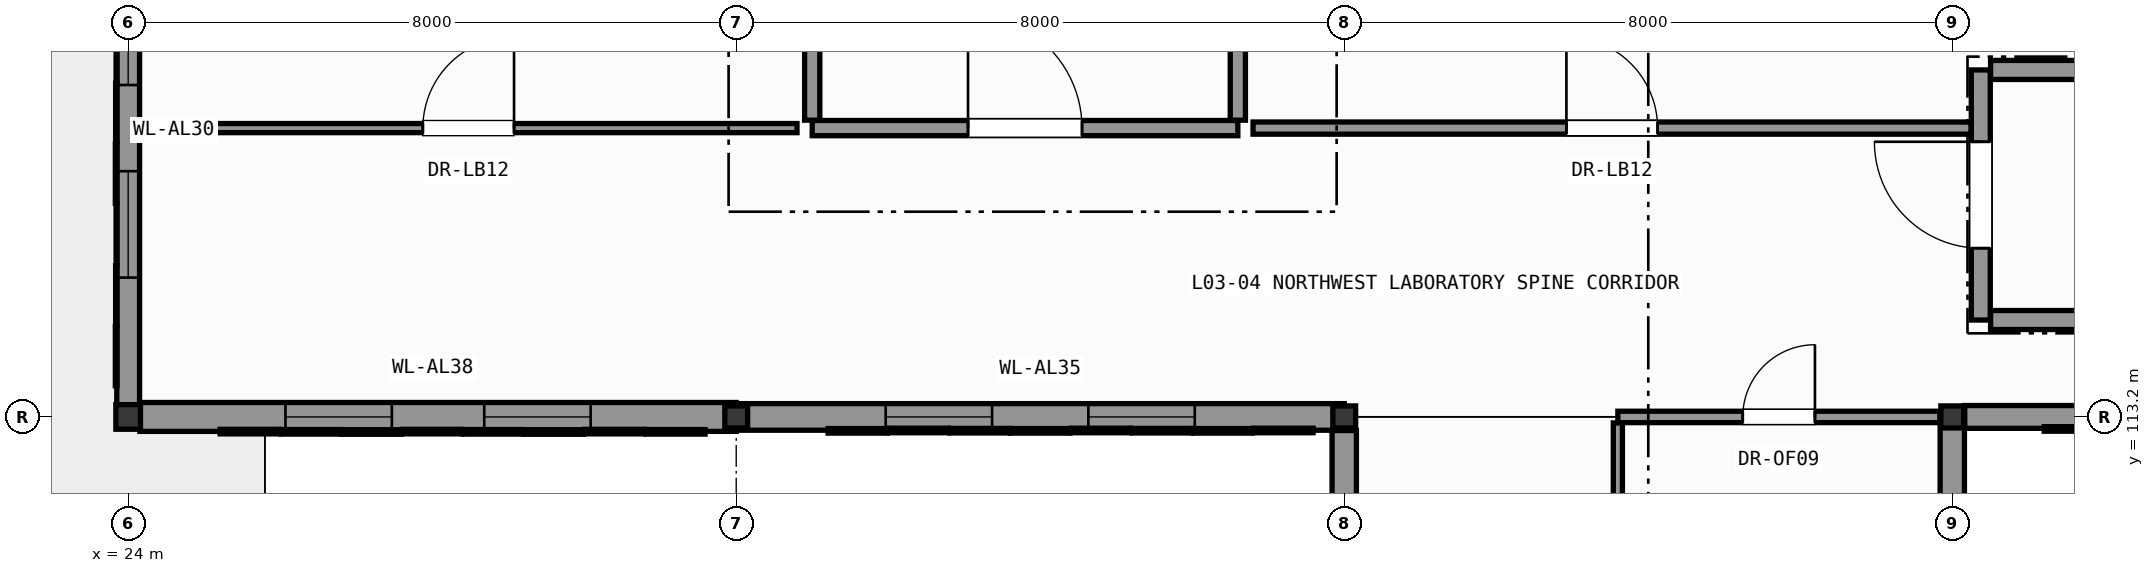
"""IFC4 building model, lengths in metres.
Left out: names, types, materials, properties, quantities, classifications, styles, units other than length and angle.
Written with IfcOpenShell. Run it as: python <this file> out.ifc"""

import sys

from ifc_helpers import new_model, si_unit, direction, frame, frame_2d, origin, origin_2d, place, context, subcontext, project, spatial, rectangle, hollow_circle, i_section, extrude, element, fill, save


model = new_model("IFC4")
c1 = context("Model", 3, precision=1e-05, world=origin(), true_north=direction((0.0, 1.0)))
c2 = subcontext(c1, "Body", "Model", "MODEL_VIEW")
j1 = project(units=[si_unit("LENGTHUNIT", "METRE"), si_unit("PLANEANGLEUNIT", "RADIAN")], contexts=[c1])
p1 = place(None, origin())
s1 = spatial("IfcSite", under=j1, at=p1, CompositionType="ELEMENT")
p2 = place(p1, origin())
s2 = spatial("IfcBuilding", under=s1, at=p2, CompositionType="ELEMENT")
p3 = place(p2, frame((0.0, 0.0, 13.2)))
s3 = spatial("IfcBuildingStorey", under=s2, at=p3, CompositionType="ELEMENT", Elevation=13.2)
p4 = place(p3, frame((24.0, 113.2, 0.0), z_axis=(0.0, 0.0, 1.0), x_axis=(1.0, 0.0, 0.0)))
e1 = element("IfcColumn", 1, at=p4, inside=s3, PredefinedType="COLUMN", context=c2, shape_type="SweptSolid", body=[
    extrude(hollow_circle(Radius=0.162, WallThickness=0.016, at=origin_2d()), origin(), (0.0, 0.0, 1.0), 4.8),
])
for number, where, z_axis, x_axis in (
    (2, (32.0, 113.2, 0.0), (0.0, 0.0, 1.0), (1.0, 0.0, 0.0)),
    (3, (40.0, 113.2, 0.0), (0.0, 0.0, 1.0), (1.0, 0.0, 0.0)),
    (4, (48.0, 113.2, 0.0), (0.0, 0.0, 1.0), (1.0, 0.0, 0.0)),
):
    element("IfcColumn", number, at=place(p3, frame(where, z_axis=z_axis, x_axis=x_axis)), inside=s3, PredefinedType="COLUMN", context=c2, shape_type="SweptSolid", body=[
        extrude(i_section(OverallWidth=0.3, OverallDepth=0.29, WebThickness=0.009, FlangeThickness=0.014, FilletRadius=0.027, at=origin_2d()), origin(), (0.0, 0.0, 1.0), 4.8),
    ])
p5 = place(p3, frame((48.0, 113.2, 0.0), z_axis=(0.0, 0.0, 1.0), x_axis=(0.0, -1.0, 0.0)))
e5 = element("IfcWall", 5, at=p5, inside=s3, PredefinedType="SOLIDWALL", context=c2, shape_type="SweptSolid", body=[
    extrude(rectangle(XDim=7.6, YDim=0.32, at=frame_2d((3.8, 0.0))), origin(), (0.0, 0.0, 1.0), 4.045),
])
p6 = place(p5, frame((1.758, 0.0, 0.95)))
e6 = element("IfcOpeningElement", 6, at=p6, cuts=e5, PredefinedType="OPENING", context=c2, shape_type="SweptSolid", body=[
    extrude(rectangle(XDim=1.55, YDim=2.1, at=frame_2d((0.775, 1.05))), frame((0.0, 0.17, 0.0), z_axis=(0.0, -1.0, 0.0), x_axis=(1.0, 0.0, 0.0)), (0.0, 0.0, 1.0), 0.34),
])
p7 = place(p5, frame((4.292, 0.0, 0.95)))
e7 = element("IfcOpeningElement", 7, at=p7, cuts=e5, PredefinedType="OPENING", context=c2, shape_type="SweptSolid", body=[
    extrude(rectangle(XDim=1.55, YDim=2.1, at=frame_2d((0.775, 1.05))), frame((0.0, 0.17, 0.0), z_axis=(0.0, -1.0, 0.0), x_axis=(1.0, 0.0, 0.0)), (0.0, 0.0, 1.0), 0.34),
])
p8 = place(p3, frame((56.0, 113.2, 0.0), z_axis=(0.0, 0.0, 1.0), x_axis=(-1.0, 0.0, 0.0)))
e8 = element("IfcWall", 8, at=p8, inside=s3, PredefinedType="SOLIDWALL", context=c2, shape_type="SweptSolid", body=[
    extrude(rectangle(XDim=7.836, YDim=0.3, at=frame_2d((3.918, 0.0))), origin(), (0.0, 0.0, 1.0), 4.145),
])
p9 = place(p8, frame((1.912, 0.0, 0.95)))
e9 = element("IfcOpeningElement", 9, at=p9, cuts=e8, PredefinedType="OPENING", context=c2, shape_type="SweptSolid", body=[
    extrude(rectangle(XDim=1.4, YDim=2.0, at=frame_2d((0.7, 1.0))), frame((0.0, 0.16, 0.0), z_axis=(0.0, -1.0, 0.0), x_axis=(1.0, 0.0, 0.0)), (0.0, 0.0, 1.0), 0.32),
])
p10 = place(p8, frame((4.524, 0.0, 0.95)))
e10 = element("IfcOpeningElement", 10, at=p10, cuts=e8, PredefinedType="OPENING", context=c2, shape_type="SweptSolid", body=[
    extrude(rectangle(XDim=1.4, YDim=2.0, at=frame_2d((0.7, 1.0))), frame((0.0, 0.16, 0.0), z_axis=(0.0, -1.0, 0.0), x_axis=(1.0, 0.0, 0.0)), (0.0, 0.0, 1.0), 0.32),
])
p11 = place(p3, frame((24.0, 113.2, 0.0), z_axis=(0.0, 0.0, 1.0), x_axis=(0.0, 1.0, 0.0)))
e11 = element("IfcWall", 11, at=p11, inside=s3, PredefinedType="SOLIDWALL", context=c2, shape_type="SweptSolid", body=[
    extrude(rectangle(XDim=7.6, YDim=0.3, at=frame_2d((3.8, 0.0))), origin(), (0.0, 0.0, 1.0), 4.085),
])
p12 = place(p11, frame((1.833, 0.0, 0.95)))
e12 = element("IfcOpeningElement", 12, at=p12, cuts=e11, PredefinedType="OPENING", context=c2, shape_type="SweptSolid", body=[
    extrude(rectangle(XDim=1.4, YDim=2.0, at=frame_2d((0.7, 1.0))), frame((0.0, 0.16, 0.0), z_axis=(0.0, -1.0, 0.0), x_axis=(1.0, 0.0, 0.0)), (0.0, 0.0, 1.0), 0.32),
])
p13 = place(p11, frame((4.367, 0.0, 0.95)))
e13 = element("IfcOpeningElement", 13, at=p13, cuts=e11, PredefinedType="OPENING", context=c2, shape_type="SweptSolid", body=[
    extrude(rectangle(XDim=1.4, YDim=2.0, at=frame_2d((0.7, 1.0))), frame((0.0, 0.16, 0.0), z_axis=(0.0, -1.0, 0.0), x_axis=(1.0, 0.0, 0.0)), (0.0, 0.0, 1.0), 0.32),
])
p14 = place(p3, frame((32.0, 113.2, 0.0), z_axis=(0.0, 0.0, 1.0), x_axis=(-1.0, 0.0, 0.0)))
e14 = element("IfcWall", 14, at=p14, inside=s3, PredefinedType="SOLIDWALL", context=c2, shape_type="SweptSolid", body=[
    extrude(rectangle(XDim=7.846, YDim=0.38, at=frame_2d((3.923, 0.0))), origin(), (0.0, 0.0, 1.0), 4.045),
])
p15 = place(p14, frame((1.915, 0.0, 0.95)))
e15 = element("IfcOpeningElement", 15, at=p15, cuts=e14, PredefinedType="OPENING", context=c2, shape_type="SweptSolid", body=[
    extrude(rectangle(XDim=1.4, YDim=2.0, at=frame_2d((0.7, 1.0))), frame((0.0, 0.2, 0.0), z_axis=(0.0, -1.0, 0.0), x_axis=(1.0, 0.0, 0.0)), (0.0, 0.0, 1.0), 0.4),
])
p16 = place(p14, frame((4.531, 0.0, 0.95)))
e16 = element("IfcOpeningElement", 16, at=p16, cuts=e14, PredefinedType="OPENING", context=c2, shape_type="SweptSolid", body=[
    extrude(rectangle(XDim=1.4, YDim=2.0, at=frame_2d((0.7, 1.0))), frame((0.0, 0.2, 0.0), z_axis=(0.0, -1.0, 0.0), x_axis=(1.0, 0.0, 0.0)), (0.0, 0.0, 1.0), 0.4),
])
p17 = place(p3, frame((40.0, 113.2, 0.0), z_axis=(0.0, 0.0, 1.0), x_axis=(-1.0, 0.0, 0.0)))
e17 = element("IfcWall", 17, at=p17, inside=s3, PredefinedType="SOLIDWALL", context=c2, shape_type="SweptSolid", body=[
    extrude(rectangle(XDim=8.0, YDim=0.35, at=frame_2d((4.0, 0.0))), origin(), (0.0, 0.0, 1.0), 4.265),
])
p18 = place(p17, frame((1.967, 0.0, 0.95)))
e18 = element("IfcOpeningElement", 18, at=p18, cuts=e17, PredefinedType="OPENING", context=c2, shape_type="SweptSolid", body=[
    extrude(rectangle(XDim=1.4, YDim=2.0, at=frame_2d((0.7, 1.0))), frame((0.0, 0.185, 0.0), z_axis=(0.0, -1.0, 0.0), x_axis=(1.0, 0.0, 0.0)), (0.0, 0.0, 1.0), 0.37),
])
p19 = place(p17, frame((4.633, 0.0, 0.95)))
e19 = element("IfcOpeningElement", 19, at=p19, cuts=e17, PredefinedType="OPENING", context=c2, shape_type="SweptSolid", body=[
    extrude(rectangle(XDim=1.4, YDim=2.0, at=frame_2d((0.7, 1.0))), frame((0.0, 0.185, 0.0), z_axis=(0.0, -1.0, 0.0), x_axis=(1.0, 0.0, 0.0)), (0.0, 0.0, 1.0), 0.37),
])
p20 = place(p3, frame((40.0, 105.6, 0.0), z_axis=(0.0, 0.0, 1.0), x_axis=(0.0, 1.0, 0.0)))
e20 = element("IfcWall", 20, at=p20, inside=s3, PredefinedType="SOLIDWALL", context=c2, shape_type="SweptSolid", body=[
    extrude(rectangle(XDim=7.421, YDim=0.32, at=frame_2d((3.71, 0.0))), origin(), (0.0, 0.0, 1.0), 4.045),
])
p21 = place(p20, frame((1.624, 0.0, 0.95)))
e21 = element("IfcOpeningElement", 21, at=p21, cuts=e20, PredefinedType="OPENING", context=c2, shape_type="SweptSolid", body=[
    extrude(rectangle(XDim=1.7, YDim=2.7, at=frame_2d((0.85, 1.35))), frame((0.0, 0.17, 0.0), z_axis=(0.0, -1.0, 0.0), x_axis=(1.0, 0.0, 0.0)), (0.0, 0.0, 1.0), 0.34),
])
p22 = place(p20, frame((4.097, 0.0, 0.95)))
e22 = element("IfcOpeningElement", 22, at=p22, cuts=e20, PredefinedType="OPENING", context=c2, shape_type="SweptSolid", body=[
    extrude(rectangle(XDim=1.7, YDim=2.7, at=frame_2d((0.85, 1.35))), frame((0.0, 0.17, 0.0), z_axis=(0.0, -1.0, 0.0), x_axis=(1.0, 0.0, 0.0)), (0.0, 0.0, 1.0), 0.34),
])
p23 = place(p3, frame((48.375, 114.475, 0.0), z_axis=(0.0, 0.0, 1.0), x_axis=(0.0, 1.0, 0.0)))
e23 = element("IfcWall", 23, at=p23, inside=s3, PredefinedType="SHEAR", context=c2, shape_type="SweptSolid", body=[
    extrude(rectangle(XDim=3.29, YDim=0.25, at=frame_2d((1.645, 0.0))), origin(), (0.0, 0.0, 1.0), 4.56),
])
p24 = place(p23, frame((0.945, 0.0, 0.0)))
e24 = element("IfcOpeningElement", 24, at=p24, cuts=e23, PredefinedType="OPENING", context=c2, shape_type="SweptSolid", body=[
    extrude(rectangle(XDim=1.4, YDim=2.2, at=frame_2d((0.7, 1.1))), frame((0.0, 0.135, 0.0), z_axis=(0.0, -1.0, 0.0), x_axis=(1.0, 0.0, 0.0)), (0.0, 0.0, 1.0), 0.27),
])
for number, where, z_axis, x_axis in (
    (25, (48.504, 114.475, 0.0), (0.0, 0.0, 1.0), (1.0, 0.0, 0.0)),
    (26, (48.504, 117.765, 0.0), (0.0, 0.0, 1.0), (1.0, 0.0, 0.0)),
):
    element("IfcWall", number, at=place(p3, frame(where, z_axis=z_axis, x_axis=x_axis)), inside=s3, PredefinedType="SHEAR", context=c2, shape_type="SweptSolid", body=[
        extrude(rectangle(XDim=6.892, YDim=0.25, at=frame_2d((3.446, 0.0))), origin(), (0.0, 0.0, 1.0), 4.56),
    ])
p25 = place(p3, frame((33.0, 117.0, 0.0), z_axis=(0.0, 0.0, 1.0), x_axis=(1.0, 0.0, 0.0)))
e27 = element("IfcWall", 27, at=p25, inside=s3, PredefinedType="PARTITIONING", context=c2, shape_type="SweptSolid", body=[
    extrude(rectangle(XDim=5.6, YDim=0.2, at=frame_2d((2.8, 0.0))), origin(), (0.0, 0.0, 1.0), 4.56),
])
p26 = place(p25, frame((2.05, 0.0, 0.0)))
e28 = element("IfcOpeningElement", 28, at=p26, cuts=e27, PredefinedType="OPENING", context=c2, shape_type="SweptSolid", body=[
    extrude(rectangle(XDim=1.5, YDim=2.2, at=frame_2d((0.75, 1.1))), frame((0.0, 0.11, 0.0), z_axis=(0.0, -1.0, 0.0), x_axis=(1.0, 0.0, 0.0)), (0.0, 0.0, 1.0), 0.22),
])
for number, where, z_axis, x_axis in (
    (29, (33.0, 117.104, 0.0), (0.0, 0.0, 1.0), (0.0, 1.0, 0.0)),
    (30, (38.6, 117.104, 0.0), (0.0, 0.0, 1.0), (0.0, 1.0, 0.0)),
):
    element("IfcWall", number, at=place(p3, frame(where, z_axis=z_axis, x_axis=x_axis)), inside=s3, PredefinedType="PARTITIONING", context=c2, shape_type="SweptSolid", body=[
        extrude(rectangle(XDim=5.096, YDim=0.2, at=frame_2d((2.548, 0.0))), origin(), (0.0, 0.0, 1.0), 4.56),
    ])
p27 = place(p3, frame((24.154, 117.0, 0.0), z_axis=(0.0, 0.0, 1.0), x_axis=(1.0, 0.0, 0.0)))
e31 = element("IfcWall", 31, at=p27, inside=s3, PredefinedType="PARTITIONING", context=c2, shape_type="SweptSolid", body=[
    extrude(rectangle(XDim=8.646, YDim=0.12, at=frame_2d((4.323, 0.0))), origin(), (0.0, 0.0, 1.0), 4.56),
])
p28 = place(p27, frame((3.723, 0.0, 0.0)))
e32 = element("IfcOpeningElement", 32, at=p28, cuts=e31, PredefinedType="OPENING", context=c2, shape_type="SweptSolid", body=[
    extrude(rectangle(XDim=1.2, YDim=2.2, at=frame_2d((0.6, 1.1))), frame((0.0, 0.07, 0.0), z_axis=(0.0, -1.0, 0.0), x_axis=(1.0, 0.0, 0.0)), (0.0, 0.0, 1.0), 0.14),
])
p29 = place(p3, frame((38.8, 117.0, 0.0), z_axis=(0.0, 0.0, 1.0), x_axis=(1.0, 0.0, 0.0)))
e33 = element("IfcWall", 33, at=p29, inside=s3, PredefinedType="PARTITIONING", context=c2, shape_type="SweptSolid", body=[
    extrude(rectangle(XDim=9.446, YDim=0.16, at=frame_2d((4.723, 0.0))), origin(), (0.0, 0.0, 1.0), 4.56),
])
p30 = place(p29, frame((4.123, 0.0, 0.0)))
e34 = element("IfcOpeningElement", 34, at=p30, cuts=e33, PredefinedType="OPENING", context=c2, shape_type="SweptSolid", body=[
    extrude(rectangle(XDim=1.2, YDim=2.2, at=frame_2d((0.6, 1.1))), frame((0.0, 0.09, 0.0), z_axis=(0.0, -1.0, 0.0), x_axis=(1.0, 0.0, 0.0)), (0.0, 0.0, 1.0), 0.18),
])
p31 = place(p3, frame((43.6, 113.2, 0.0), z_axis=(0.0, 0.0, 1.0), x_axis=(1.0, 0.0, 0.0)))
e35 = element("IfcWall", 35, at=p31, inside=s3, PredefinedType="PARTITIONING", context=c2, shape_type="SweptSolid", body=[
    extrude(rectangle(XDim=4.236, YDim=0.15, at=frame_2d((2.118, 0.0))), origin(), (0.0, 0.0, 1.0), 4.225),
])
p32 = place(p31, frame((1.643, 0.0, 0.0)))
e36 = element("IfcOpeningElement", 36, at=p32, cuts=e35, PredefinedType="OPENING", context=c2, shape_type="SweptSolid", body=[
    extrude(rectangle(XDim=0.95, YDim=2.1, at=frame_2d((0.475, 1.05))), frame((0.0, 0.085, 0.0), z_axis=(0.0, -1.0, 0.0), x_axis=(1.0, 0.0, 0.0)), (0.0, 0.0, 1.0), 0.17),
])
p33 = place(p3, frame((43.6, 83.4, 0.0), z_axis=(0.0, 0.0, 1.0), x_axis=(0.0, 1.0, 0.0)))
e37 = element("IfcWall", 37, at=p33, inside=s3, PredefinedType="PARTITIONING", context=c2, shape_type="SweptSolid", body=[
    extrude(rectangle(XDim=29.721, YDim=0.12, at=frame_2d((14.861, 0.0))), origin(), (0.0, 0.0, 1.0), 4.56),
])
p34 = place(p33, frame((14.335, 0.0, 0.0)))
e38 = element("IfcOpeningElement", 38, at=p34, cuts=e37, PredefinedType="OPENING", context=c2, shape_type="SweptSolid", body=[
    extrude(rectangle(XDim=1.05, YDim=2.2, at=frame_2d((0.525, 1.1))), frame((0.0, 0.07, 0.0), z_axis=(0.0, -1.0, 0.0), x_axis=(1.0, 0.0, 0.0)), (0.0, 0.0, 1.0), 0.14),
])
p35 = place(p12, origin())
e39 = element("IfcWindow", 39, at=p35, inside=s3, PartitioningType="SINGLE_PANEL", PredefinedType="WINDOW", context=c2, shape_type="SweptSolid", body=[
    extrude(rectangle(XDim=1.4, YDim=2.0, at=frame_2d((0.7, 1.0))), frame((0.0, 0.03, 0.0), z_axis=(0.0, -1.0, 0.0), x_axis=(1.0, 0.0, 0.0)), (0.0, 0.0, 1.0), 0.06),
])
fill(e12, e39)
p36 = place(p13, origin())
e40 = element("IfcWindow", 40, at=p36, inside=s3, PartitioningType="SINGLE_PANEL", PredefinedType="WINDOW", context=c2, shape_type="SweptSolid", body=[
    extrude(rectangle(XDim=1.4, YDim=2.0, at=frame_2d((0.7, 1.0))), frame((0.0, 0.03, 0.0), z_axis=(0.0, -1.0, 0.0), x_axis=(1.0, 0.0, 0.0)), (0.0, 0.0, 1.0), 0.06),
])
fill(e13, e40)
p37 = place(p15, origin())
e41 = element("IfcWindow", 41, at=p37, inside=s3, PartitioningType="SINGLE_PANEL", PredefinedType="WINDOW", context=c2, shape_type="SweptSolid", body=[
    extrude(rectangle(XDim=1.4, YDim=2.0, at=frame_2d((0.7, 1.0))), frame((0.0, 0.03, 0.0), z_axis=(0.0, -1.0, 0.0), x_axis=(1.0, 0.0, 0.0)), (0.0, 0.0, 1.0), 0.06),
])
fill(e15, e41)
p38 = place(p16, origin())
e42 = element("IfcWindow", 42, at=p38, inside=s3, PartitioningType="SINGLE_PANEL", PredefinedType="WINDOW", context=c2, shape_type="SweptSolid", body=[
    extrude(rectangle(XDim=1.4, YDim=2.0, at=frame_2d((0.7, 1.0))), frame((0.0, 0.03, 0.0), z_axis=(0.0, -1.0, 0.0), x_axis=(1.0, 0.0, 0.0)), (0.0, 0.0, 1.0), 0.06),
])
fill(e16, e42)
p39 = place(p18, origin())
e43 = element("IfcWindow", 43, at=p39, inside=s3, PartitioningType="SINGLE_PANEL", PredefinedType="WINDOW", context=c2, shape_type="SweptSolid", body=[
    extrude(rectangle(XDim=1.4, YDim=2.0, at=frame_2d((0.7, 1.0))), frame((0.0, 0.03, 0.0), z_axis=(0.0, -1.0, 0.0), x_axis=(1.0, 0.0, 0.0)), (0.0, 0.0, 1.0), 0.06),
])
fill(e18, e43)
p40 = place(p19, origin())
e44 = element("IfcWindow", 44, at=p40, inside=s3, PartitioningType="SINGLE_PANEL", PredefinedType="WINDOW", context=c2, shape_type="SweptSolid", body=[
    extrude(rectangle(XDim=1.4, YDim=2.0, at=frame_2d((0.7, 1.0))), frame((0.0, 0.03, 0.0), z_axis=(0.0, -1.0, 0.0), x_axis=(1.0, 0.0, 0.0)), (0.0, 0.0, 1.0), 0.06),
])
fill(e19, e44)
p41 = place(p24, origin())
e45 = element("IfcDoor", 45, at=p41, inside=s3, OperationType="SINGLE_SWING_RIGHT", PredefinedType="DOOR", context=c2, shape_type="SweptSolid", body=[
    extrude(rectangle(XDim=1.4, YDim=2.2, at=frame_2d((0.7, 1.1))), frame((0.0, 0.025, 0.0), z_axis=(0.0, -1.0, 0.0), x_axis=(1.0, 0.0, 0.0)), (0.0, 0.0, 1.0), 0.05),
])
fill(e24, e45)
p42 = place(p26, origin())
e46 = element("IfcDoor", 46, at=p42, inside=s3, OperationType="SINGLE_SWING_LEFT", PredefinedType="DOOR", context=c2, shape_type="SweptSolid", body=[
    extrude(rectangle(XDim=1.5, YDim=2.2, at=frame_2d((0.75, 1.1))), frame((0.0, 0.025, 0.0), z_axis=(0.0, -1.0, 0.0), x_axis=(1.0, 0.0, 0.0)), (0.0, 0.0, 1.0), 0.05),
])
fill(e28, e46)
p43 = place(p28, origin())
e47 = element("IfcDoor", 47, at=p43, inside=s3, OperationType="SINGLE_SWING_RIGHT", PredefinedType="DOOR", context=c2, shape_type="SweptSolid", body=[
    extrude(rectangle(XDim=1.2, YDim=2.2, at=frame_2d((0.6, 1.1))), frame((0.0, 0.025, 0.0), z_axis=(0.0, -1.0, 0.0), x_axis=(1.0, 0.0, 0.0)), (0.0, 0.0, 1.0), 0.05),
])
fill(e32, e47)
p44 = place(p30, origin())
e48 = element("IfcDoor", 48, at=p44, inside=s3, OperationType="SINGLE_SWING_LEFT", PredefinedType="DOOR", context=c2, shape_type="SweptSolid", body=[
    extrude(rectangle(XDim=1.2, YDim=2.2, at=frame_2d((0.6, 1.1))), frame((0.0, 0.025, 0.0), z_axis=(0.0, -1.0, 0.0), x_axis=(1.0, 0.0, 0.0)), (0.0, 0.0, 1.0), 0.05),
])
fill(e34, e48)
p45 = place(p32, origin())
e49 = element("IfcDoor", 49, at=p45, inside=s3, OperationType="SINGLE_SWING_RIGHT", PredefinedType="DOOR", context=c2, shape_type="SweptSolid", body=[
    extrude(rectangle(XDim=0.95, YDim=2.1, at=frame_2d((0.475, 1.05))), frame((0.0, 0.025, 0.0), z_axis=(0.0, -1.0, 0.0), x_axis=(1.0, 0.0, 0.0)), (0.0, 0.0, 1.0), 0.05),
])
fill(e36, e49)
save(model, sys.argv[1])
